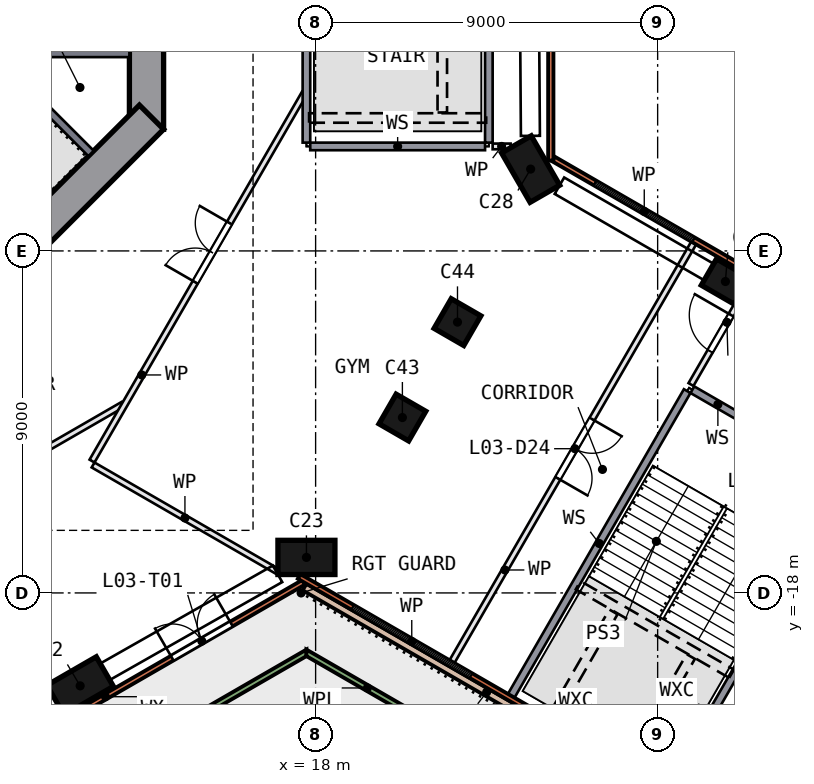
"""IFC4 building model, lengths in metres.
Left out: names, types, materials, properties, quantities, classifications, styles, units other than length and angle.
Written with IfcOpenShell. Run it as: python <this file> out.ifc"""

import sys

from ifc_helpers import new_model, si_unit, direction, frame, frame_2d, origin, origin_2d, place, context, subcontext, project, spatial, polyline, rectangle, outline, extrude, element, fill, save


model = new_model("IFC4")
c1 = context("Model", 3, precision=1e-05, world=origin(), true_north=direction((0.0, 1.0)))
c2 = subcontext(c1, "Body", "Model", "MODEL_VIEW")
j1 = project(units=[si_unit("LENGTHUNIT", "METRE"), si_unit("PLANEANGLEUNIT", "RADIAN")], contexts=[c1])
p1 = place(None, origin())
s1 = spatial("IfcSite", under=j1, at=p1, CompositionType="ELEMENT")
p2 = place(p1, origin())
s2 = spatial("IfcBuilding", under=s1, at=p2, CompositionType="ELEMENT")
p3 = place(p2, frame((0.0, 0.0, 19.0)))
s3 = spatial("IfcBuildingStorey", under=s2, at=p3, CompositionType="ELEMENT", Elevation=19.0)
for number, where, z_axis, x_axis in (
    (1, (11.804, -20.445, 0.0), (0.0, 0.0, 1.0), (0.866, 0.5, 0.0)),
    (2, (17.758, -17.065, 0.0), (0.0, 0.0, 1.0), (-1.0, 0.0, 0.0)),
):
    element("IfcColumn", number, at=place(p3, frame(where, z_axis=z_axis, x_axis=x_axis)), inside=s3, PredefinedType="COLUMN", context=c2, shape_type="SweptSolid", body=[
        extrude(rectangle(XDim=1.5, YDim=0.9, at=origin_2d()), origin(), (0.0, 0.0, 1.0), 4.05),
    ])
p4 = place(p3, frame((28.783, -9.805, 0.0), z_axis=(0.0, 0.0, 1.0), x_axis=(-0.866025404, 0.5, 0.0)))
e3 = element("IfcColumn", 3, at=p4, inside=s3, PredefinedType="COLUMN", context=c2, shape_type="SweptSolid", body=[
    extrude(rectangle(XDim=1.0, YDim=0.8, at=origin_2d()), origin(), (0.0, 0.0, 1.0), 4.05),
])
p5 = place(p3, frame((23.658, -6.846, 0.0), z_axis=(0.0, 0.0, 1.0), x_axis=(0.5, -0.866025404, 0.0)))
e4 = element("IfcColumn", 4, at=p5, inside=s3, PredefinedType="COLUMN", context=c2, shape_type="SweptSolid", body=[
    extrude(rectangle(XDim=1.5, YDim=0.9, at=origin_2d()), origin(), (0.0, 0.0, 1.0), 4.05),
])
for number, where, z_axis, x_axis in (
    (5, (20.283, -13.385, 0.0), (0.0, 0.0, 1.0), (0.866, -0.5, 0.0)),
    (6, (21.733, -10.873, 0.0), (0.0, 0.0, 1.0), (0.866, -0.5, 0.0)),
):
    element("IfcColumn", number, at=place(p3, frame(where, z_axis=z_axis, x_axis=x_axis)), inside=s3, PredefinedType="COLUMN", context=c2, shape_type="SweptSolid", body=[
        extrude(rectangle(XDim=0.9, YDim=0.9, at=origin_2d()), origin(), (0.0, 0.0, 1.0), 4.05),
    ])
p6 = place(p3, frame((13.55, -5.799, 0.0), z_axis=(0.0, 0.0, 1.0), x_axis=(0.0, 1.0, 0.0)))
e7 = element("IfcWall", 7, at=p6, inside=s3, PredefinedType="SHEAR", context=c2, shape_type="SweptSolid", body=[
    extrude(rectangle(XDim=11.598, YDim=0.9, at=frame_2d((5.799, 0.0))), origin(), (0.0, 0.0, 1.0), 4.5),
])
p7 = place(p6, frame((4.899, 0.0, 0.0)))
e8 = element("IfcOpeningElement", 8, at=p7, cuts=e7, PredefinedType="OPENING", context=c2, shape_type="SweptSolid", body=[
    extrude(rectangle(XDim=1.8, YDim=2.1, at=frame_2d((0.9, 1.05))), frame((0.0, 0.46, 0.0), z_axis=(0.0, -1.0, 0.0), x_axis=(1.0, 0.0, 0.0)), (0.0, 0.0, 1.0), 0.92),
])
p8 = place(p3, frame((5.481, -13.682, 0.0), z_axis=(0.0, 0.0, 1.0), x_axis=(0.707106781, 0.707106781, 0.0)))
e9 = element("IfcWall", 9, at=p8, inside=s3, PredefinedType="SHEAR", context=c2, shape_type="SweptSolid", body=[
    extrude(rectangle(XDim=11.598, YDim=0.9, at=frame_2d((5.799, 0.0))), origin(), (0.0, 0.0, 1.0), 4.5),
])
p9 = place(p8, frame((2.099, 0.0, 0.0)))
e10 = element("IfcOpeningElement", 10, at=p9, cuts=e9, PredefinedType="OPENING", context=c2, shape_type="SweptSolid", body=[
    extrude(rectangle(XDim=1.2, YDim=2.1, at=frame_2d((0.6, 1.05))), frame((0.0, 0.46, 0.0), z_axis=(0.0, -1.0, 0.0), x_axis=(1.0, 0.0, 0.0)), (0.0, 0.0, 1.0), 0.92),
])
p10 = place(p3, frame((6.603, -24.118, 0.0), z_axis=(0.0, 0.0, 1.0), x_axis=(0.866023287, 0.500003667, 0.0)))
e11 = element("IfcWall", 11, at=p10, inside=s3, PredefinedType="SOLIDWALL", context=c2, shape_type="SweptSolid", body=[
    extrude(rectangle(XDim=12.801, YDim=0.14, at=frame_2d((6.4, 0.0))), origin(), (0.0, 0.0, 1.0), 4.05),
])
p11 = place(p10, frame((1.748, 0.0, 0.9)))
e12 = element("IfcOpeningElement", 12, at=p11, cuts=e11, PredefinedType="OPENING", context=c2, shape_type="SweptSolid", body=[
    extrude(rectangle(XDim=3.0, YDim=2.4, at=frame_2d((1.5, 1.2))), frame((0.0, 0.08, 0.0), z_axis=(0.0, -1.0, 0.0), x_axis=(1.0, 0.0, 0.0)), (0.0, 0.0, 1.0), 0.16),
])
p12 = place(p10, frame((8.802, 0.0, 0.0)))
e13 = element("IfcOpeningElement", 13, at=p12, cuts=e11, PredefinedType="OPENING", context=c2, shape_type="SweptSolid", body=[
    extrude(rectangle(XDim=1.8, YDim=2.4, at=frame_2d((0.9, 1.2))), frame((0.0, 0.08, 0.0), z_axis=(0.0, -1.0, 0.0), x_axis=(1.0, 0.0, 0.0)), (0.0, 0.0, 1.0), 0.16),
])
p13 = place(p3, frame((17.565, -17.566, 0.0), z_axis=(0.0, 0.0, 1.0), x_axis=(0.866028022, -0.499995465, 0.0)))
e14 = element("IfcWall", 14, at=p13, inside=s3, PredefinedType="SOLIDWALL", context=c2, shape_type="SweptSolid", body=[
    extrude(rectangle(XDim=11.405, YDim=0.14, at=frame_2d((5.702, 0.0))), origin(), (0.0, 0.0, 1.0), 4.05),
])
p14 = place(p13, frame((1.623, 0.0, 0.9)))
e15 = element("IfcOpeningElement", 15, at=p14, cuts=e14, PredefinedType="OPENING", context=c2, shape_type="SweptSolid", body=[
    extrude(rectangle(XDim=3.6, YDim=2.4, at=frame_2d((1.8, 1.2))), frame((0.0, 0.08, 0.0), z_axis=(0.0, -1.0, 0.0), x_axis=(1.0, 0.0, 0.0)), (0.0, 0.0, 1.0), 0.16),
])
p15 = place(p3, frame((33.751, -12.062, 0.0), z_axis=(0.0, 0.0, 1.0), x_axis=(-0.86602647, 0.499998154, 0.0)))
e16 = element("IfcWall", 16, at=p15, inside=s3, PredefinedType="SOLIDWALL", context=c2, shape_type="SweptSolid", body=[
    extrude(rectangle(XDim=10.961, YDim=0.14, at=frame_2d((5.481, 0.0))), origin(), (0.0, 0.0, 1.0), 4.05),
])
p16 = place(p15, frame((6.702, 0.0, 0.9)))
e17 = element("IfcOpeningElement", 17, at=p16, cuts=e16, PredefinedType="OPENING", context=c2, shape_type="SweptSolid", body=[
    extrude(rectangle(XDim=3.0, YDim=2.4, at=frame_2d((1.5, 1.2))), frame((0.0, 0.08, 0.0), z_axis=(0.0, -1.0, 0.0), x_axis=(1.0, 0.0, 0.0)), (0.0, 0.0, 1.0), 0.16),
])
p17 = place(p3, frame((24.188, -6.621, 0.0), z_axis=(0.0, 0.0, 1.0), x_axis=(0.0, 1.0, 0.0)))
e18 = element("IfcWall", 18, at=p17, inside=s3, PredefinedType="SOLIDWALL", context=c2, shape_type="SweptSolid", body=[
    extrude(rectangle(XDim=13.242, YDim=0.14, at=frame_2d((6.621, 0.0))), origin(), (0.0, 0.0, 1.0), 4.05),
])
p18 = place(p3, origin())
e19 = element("IfcWall", 19, at=p18, inside=s3, PredefinedType="SOLIDWALL", context=c2, shape_type="SweptSolid", body=[
    extrude(outline(polyline([(27.179, -23.428), (27.407, -23.329), (17.758, -17.758), (17.658, -17.931), (27.179, -23.428)])), origin(), (0.0, 0.0, 1.0), 0.45),
])
p19 = place(p3, origin())
e20 = element("IfcWall", 20, at=p19, inside=s3, PredefinedType="SOLIDWALL", context=c2, shape_type="SweptSolid", body=[
    extrude(outline(polyline([(17.758, -19.49), (14.278, -21.5), (14.837, -21.35), (17.758, -19.664), (17.758, -19.49)])), origin(), (0.0, 0.0, 1.0), 0.6),
])
p20 = place(p3, origin())
e21 = element("IfcWall", 21, at=p20, inside=s3, PredefinedType="SOLIDWALL", context=c2, shape_type="SweptSolid", body=[
    extrude(outline(polyline([(21.239, -21.5), (17.758, -19.49), (17.758, -19.664), (20.679, -21.35), (21.239, -21.5)])), origin(), (0.0, 0.0, 1.0), 0.6),
])
p21 = place(p3, origin())
e22 = element("IfcWall", 22, at=p21, inside=s3, PredefinedType="SOLIDWALL", context=c2, shape_type="SweptSolid", body=[
    extrude(outline(polyline([(13.1, -3.9), (10.9, -3.9), (10.9, -3.7), (12.9, -3.7), (12.9, -1.4), (10.9, -1.4), (10.9, -1.2), (13.1, -1.2), (13.1, -3.9)])), origin(), (0.0, 0.0, 1.0), 4.05),
])
p22 = place(p3, frame((9.334, -3.677, 0.0), z_axis=(0.0, 0.0, 1.0), x_axis=(0.707106781, -0.707106781, 0.0)))
e23 = element("IfcWall", 23, at=p22, inside=s3, PredefinedType="SOLIDWALL", context=c2, shape_type="SweptSolid", body=[
    extrude(rectangle(XDim=3.9, YDim=0.2, at=frame_2d((1.95, 0.0))), origin(), (0.0, 0.0, 1.0), 4.05),
])
p23 = place(p3, frame((12.144, -14.633, 0.0), z_axis=(0.0, 0.0, 1.0), x_axis=(0.866016603, -0.500015243, 0.0)))
e24 = element("IfcWall", 24, at=p23, inside=s3, PredefinedType="PARTITIONING", context=c2, shape_type="SweptSolid", body=[
    extrude(rectangle(XDim=5.582, YDim=0.15, at=frame_2d((2.791, 0.0))), origin(), (0.0, 0.0, 1.0), 4.05),
])
p24 = place(p3, frame((12.935, -13.038, 0.0), z_axis=(0.0, 0.0, 1.0), x_axis=(-0.866037142, -0.499979668, 0.0)))
e25 = element("IfcWall", 25, at=p24, inside=s3, PredefinedType="PARTITIONING", context=c2, shape_type="SweptSolid", body=[
    extrude(rectangle(XDim=9.367, YDim=0.15, at=frame_2d((4.683, 0.0))), origin(), (0.0, 0.0, 1.0), 4.05),
])
p25 = place(p3, frame((17.858, -6.25, 0.0), z_axis=(0.0, 0.0, 1.0), x_axis=(1.0, 0.0, 0.0)))
e26 = element("IfcWall", 26, at=p25, inside=s3, PredefinedType="SOLIDWALL", context=c2, shape_type="SweptSolid", body=[
    extrude(rectangle(XDim=4.6, YDim=0.2, at=frame_2d((2.3, 0.0))), origin(), (0.0, 0.0, 1.0), 4.05),
])
p26 = place(p3, frame((12.117, -14.53, 0.0), z_axis=(0.0, 0.0, 1.0), x_axis=(0.500001509, 0.866024532, 0.0)))
e27 = element("IfcWall", 27, at=p26, inside=s3, PredefinedType="PARTITIONING", context=c2, shape_type="SweptSolid", body=[
    extrude(rectangle(XDim=11.183, YDim=0.15, at=frame_2d((5.592, 0.0))), origin(), (0.0, 0.0, 1.0), 4.05),
])
p27 = place(p26, frame((5.433, 0.0, 0.0)))
e28 = element("IfcOpeningElement", 28, at=p27, cuts=e27, PredefinedType="OPENING", context=c2, shape_type="SweptSolid", body=[
    extrude(rectangle(XDim=1.8, YDim=2.1, at=frame_2d((0.9, 1.05))), frame((0.0, 0.085, 0.0), z_axis=(0.0, -1.0, 0.0), x_axis=(1.0, 0.0, 0.0)), (0.0, 0.0, 1.0), 0.17),
])
p28 = place(p3, frame((17.758, 3.15, 0.0), z_axis=(0.0, 0.0, 1.0), x_axis=(0.0, -1.0, 0.0)))
e29 = element("IfcWall", 29, at=p28, inside=s3, PredefinedType="SOLIDWALL", context=c2, shape_type="SweptSolid", body=[
    extrude(rectangle(XDim=9.3, YDim=0.2, at=frame_2d((4.65, 0.0))), origin(), (0.0, 0.0, 1.0), 4.05),
])
p29 = place(p3, frame((22.558, -6.15, 0.0), z_axis=(0.0, 0.0, 1.0), x_axis=(0.0, 1.0, 0.0)))
e30 = element("IfcWall", 30, at=p29, inside=s3, PredefinedType="SOLIDWALL", context=c2, shape_type="SweptSolid", body=[
    extrude(rectangle(XDim=9.5, YDim=0.2, at=frame_2d((4.75, 0.0))), origin(), (0.0, 0.0, 1.0), 4.05),
])
p30 = place(p3, frame((22.658, -6.25, 0.0), z_axis=(0.0, 0.0, 1.0), x_axis=(1.0, 0.0, 0.0)))
e31 = element("IfcWall", 31, at=p30, inside=s3, PredefinedType="PARTITIONING", context=c2, shape_type="SweptSolid", body=[
    extrude(rectangle(XDim=0.473, YDim=0.15, at=frame_2d((0.237, 0.0))), origin(), (0.0, 0.0, 1.0), 4.05),
])
p31 = place(p3, frame((28.162, -21.623, 0.0), z_axis=(0.0, 0.0, 1.0), x_axis=(0.499981072, 0.866036332, 0.0)))
e32 = element("IfcWall", 32, at=p31, inside=s3, PredefinedType="SOLIDWALL", context=c2, shape_type="SweptSolid", body=[
    extrude(rectangle(XDim=7.545, YDim=0.2, at=frame_2d((3.772, 0.0))), origin(), (0.0, 0.0, 1.0), 4.05),
])
p32 = place(p3, frame((27.777, -12.688, 0.0), z_axis=(0.0, 0.0, 1.0), x_axis=(-0.500003922, -0.866023139, 0.0)))
e33 = element("IfcWall", 33, at=p32, inside=s3, PredefinedType="SOLIDWALL", context=c2, shape_type="SweptSolid", body=[
    extrude(rectangle(XDim=9.26, YDim=0.2, at=frame_2d((4.63, 0.0))), origin(), (0.0, 0.0, 1.0), 4.05),
])
p33 = place(p3, frame((27.948, -8.792, 0.0), z_axis=(0.0, 0.0, 1.0), x_axis=(-0.499991053, -0.866030569, 0.0)))
e34 = element("IfcWall", 34, at=p33, inside=s3, PredefinedType="PARTITIONING", context=c2, shape_type="SweptSolid", body=[
    extrude(rectangle(XDim=12.72, YDim=0.15, at=frame_2d((6.36, 0.0))), origin(), (0.0, 0.0, 1.0), 4.05),
])
p34 = place(p33, frame((5.35, 0.0, 0.0)))
e35 = element("IfcOpeningElement", 35, at=p34, cuts=e34, PredefinedType="OPENING", context=c2, shape_type="SweptSolid", body=[
    extrude(rectangle(XDim=1.8, YDim=2.1, at=frame_2d((0.9, 1.05))), frame((0.0, 0.085, 0.0), z_axis=(0.0, -1.0, 0.0), x_axis=(1.0, 0.0, 0.0)), (0.0, 0.0, 1.0), 0.17),
])
p35 = place(p3, frame((27.877, -12.515, 0.0), z_axis=(0.0, 0.0, 1.0), x_axis=(0.499973122, 0.866040921, 0.0)))
e36 = element("IfcWall", 36, at=p35, inside=s3, PredefinedType="PARTITIONING", context=c2, shape_type="SweptSolid", body=[
    extrude(rectangle(XDim=3.26, YDim=0.15, at=frame_2d((1.63, 0.0))), origin(), (0.0, 0.0, 1.0), 4.05),
])
p36 = place(p35, frame((1.01, 0.0, 0.0)))
e37 = element("IfcOpeningElement", 37, at=p36, cuts=e36, PredefinedType="OPENING", context=c2, shape_type="SweptSolid", body=[
    extrude(rectangle(XDim=1.1, YDim=2.1, at=frame_2d((0.55, 1.05))), frame((0.0, 0.085, 0.0), z_axis=(0.0, -1.0, 0.0), x_axis=(1.0, 0.0, 0.0)), (0.0, 0.0, 1.0), 0.17),
])
p37 = place(p3, frame((27.914, -12.652, 0.0), z_axis=(0.0, 0.0, 1.0), x_axis=(0.86601677, -0.500014953, 0.0)))
e38 = element("IfcWall", 38, at=p37, inside=s3, PredefinedType="SOLIDWALL", context=c2, shape_type="SweptSolid", body=[
    extrude(rectangle(XDim=4.6, YDim=0.2, at=frame_2d((2.3, 0.0))), origin(), (0.0, 0.0, 1.0), 4.05),
])
p38 = place(p37, frame((1.75, 0.0, 0.0)))
e39 = element("IfcOpeningElement", 39, at=p38, cuts=e38, PredefinedType="OPENING", context=c2, shape_type="SweptSolid", body=[
    extrude(rectangle(XDim=1.1, YDim=2.1, at=frame_2d((0.55, 1.05))), frame((0.0, 0.11, 0.0), z_axis=(0.0, -1.0, 0.0), x_axis=(1.0, 0.0, 0.0)), (0.0, 0.0, 1.0), 0.22),
])
p39 = place(p12, origin())
e40 = element("IfcDoor", 40, at=p39, inside=s3, OperationType="DOUBLE_DOOR_SINGLE_SWING", PredefinedType="DOOR", context=c2, shape_type="SweptSolid", body=[
    extrude(rectangle(XDim=1.8, YDim=2.4, at=frame_2d((0.9, 1.2))), frame((0.0, 0.025, 0.0), z_axis=(0.0, -1.0, 0.0), x_axis=(1.0, 0.0, 0.0)), (0.0, 0.0, 1.0), 0.05),
])
fill(e13, e40)
p40 = place(p14, origin())
e41 = element("IfcWindow", 41, at=p40, inside=s3, PartitioningType="SINGLE_PANEL", PredefinedType="WINDOW", context=c2, shape_type="SweptSolid", body=[
    extrude(rectangle(XDim=3.6, YDim=2.4, at=frame_2d((1.8, 1.2))), frame((0.0, 0.03, 0.0), z_axis=(0.0, -1.0, 0.0), x_axis=(1.0, 0.0, 0.0)), (0.0, 0.0, 1.0), 0.06),
])
fill(e15, e41)
p41 = place(p16, origin())
e42 = element("IfcWindow", 42, at=p41, inside=s3, PartitioningType="SINGLE_PANEL", PredefinedType="WINDOW", context=c2, shape_type="SweptSolid", body=[
    extrude(rectangle(XDim=3.0, YDim=2.4, at=frame_2d((1.5, 1.2))), frame((0.0, 0.03, 0.0), z_axis=(0.0, -1.0, 0.0), x_axis=(1.0, 0.0, 0.0)), (0.0, 0.0, 1.0), 0.06),
])
fill(e17, e42)
p42 = place(p27, origin())
e43 = element("IfcDoor", 43, at=p42, inside=s3, OperationType="DOUBLE_DOOR_SINGLE_SWING", PredefinedType="DOOR", context=c2, shape_type="SweptSolid", body=[
    extrude(rectangle(XDim=1.8, YDim=2.1, at=frame_2d((0.9, 1.05))), frame((0.0, 0.025, 0.0), z_axis=(0.0, -1.0, 0.0), x_axis=(1.0, 0.0, 0.0)), (0.0, 0.0, 1.0), 0.05),
])
fill(e28, e43)
p43 = place(p34, origin())
e44 = element("IfcDoor", 44, at=p43, inside=s3, OperationType="DOUBLE_DOOR_SINGLE_SWING", PredefinedType="DOOR", context=c2, shape_type="SweptSolid", body=[
    extrude(rectangle(XDim=1.8, YDim=2.1, at=frame_2d((0.9, 1.05))), frame((0.0, 0.025, 0.0), z_axis=(0.0, -1.0, 0.0), x_axis=(1.0, 0.0, 0.0)), (0.0, 0.0, 1.0), 0.05),
])
fill(e35, e44)
p44 = place(p36, origin())
e45 = element("IfcDoor", 45, at=p44, inside=s3, OperationType="SINGLE_SWING_RIGHT", PredefinedType="DOOR", context=c2, shape_type="SweptSolid", body=[
    extrude(rectangle(XDim=1.1, YDim=2.1, at=frame_2d((0.55, 1.05))), frame((0.0, 0.025, 0.0), z_axis=(0.0, -1.0, 0.0), x_axis=(1.0, 0.0, 0.0)), (0.0, 0.0, 1.0), 0.05),
])
fill(e37, e45)
save(model, sys.argv[1])
